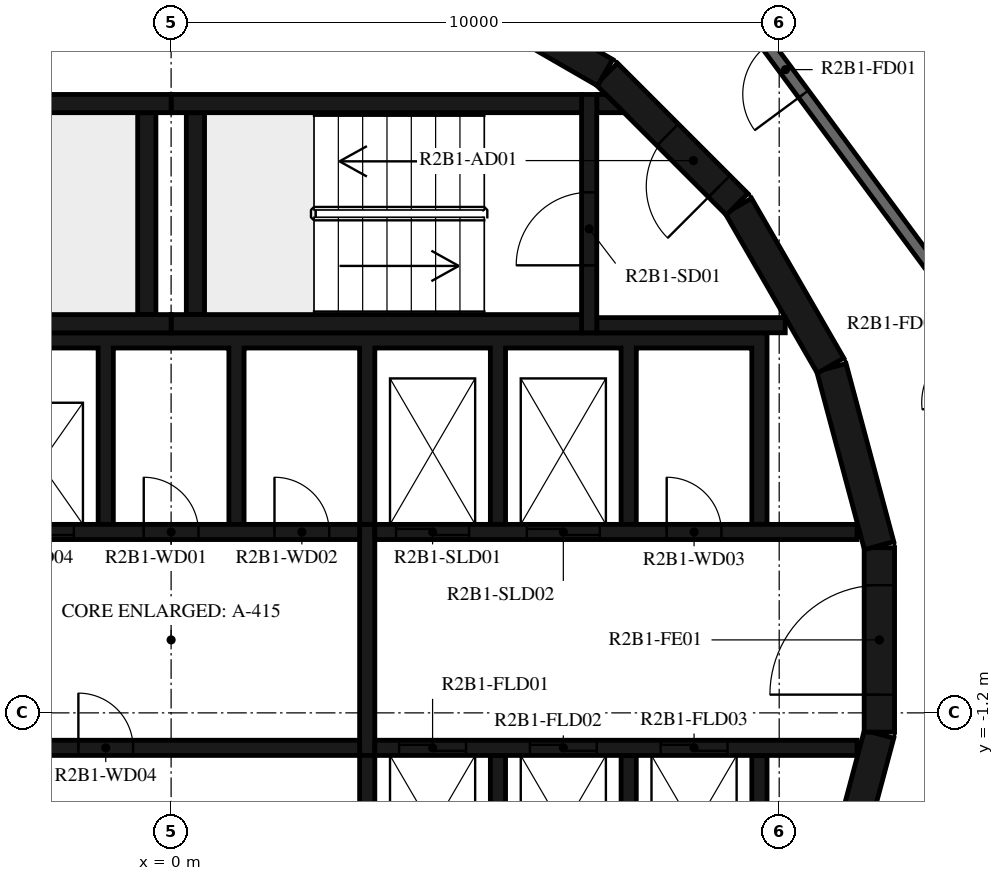
"""IFC4 building model, lengths in metres.
Left out: names, types, materials, properties, quantities, classifications, styles, units other than length and angle.
Written with IfcOpenShell. Run it as: python <this file> out.ifc"""

import sys

from ifc_helpers import new_model, si_unit, direction, frame, frame_2d, origin, place, context, subcontext, project, spatial, polyline, rectangle, outline, extrude, element, fill, save


model = new_model("IFC4")
c1 = context("Model", 3, precision=1e-05, world=origin(), true_north=direction((0.0, 1.0)))
c2 = subcontext(c1, "Body", "Model", "MODEL_VIEW")
j1 = project(units=[si_unit("LENGTHUNIT", "METRE"), si_unit("PLANEANGLEUNIT", "RADIAN")], contexts=[c1])
p1 = place(None, origin())
s1 = spatial("IfcSite", under=j1, at=p1, CompositionType="ELEMENT")
p2 = place(p1, origin())
s2 = spatial("IfcBuilding", under=s1, at=p2, CompositionType="ELEMENT")
p3 = place(p2, frame((0.0, 0.0, 87.2)))
s3 = spatial("IfcBuildingStorey", under=s2, at=p3, CompositionType="ELEMENT", Elevation=87.2)
p4 = place(p3, frame((10.858, -4.479, 0.0), z_axis=(0.0, 0.0, 1.0), x_axis=(0.258734743916, 0.965948410781, 0.0)))
e1 = element("IfcWall", 1, at=p4, inside=s3, PredefinedType="SHEAR", context=c2, shape_type="SweptSolid", body=[
    extrude(rectangle(XDim=3.033, YDim=0.5, at=frame_2d((1.516, 0.0))), origin(), (0.0, 0.0, 1.0), 3.12),
])
p5 = place(p3, frame((11.647, -1.516, 0.0), z_axis=(0.0, 0.0, 1.0), x_axis=(0.0, 1.0, 0.0)))
e2 = element("IfcWall", 2, at=p5, inside=s3, PredefinedType="SHEAR", context=c2, shape_type="SweptSolid", body=[
    extrude(rectangle(XDim=3.033, YDim=0.5, at=frame_2d((1.516, 0.0))), origin(), (0.0, 0.0, 1.0), 3.12),
])
p6 = place(p5, frame((0.616, 0.0, 0.0)))
e3 = element("IfcOpeningElement", 3, at=p6, cuts=e2, PredefinedType="OPENING", context=c2, shape_type="SweptSolid", body=[
    extrude(rectangle(XDim=1.8, YDim=2.1, at=frame_2d((0.9, 1.05))), frame((0.0, 0.26, 0.0), z_axis=(0.0, -1.0, 0.0), x_axis=(1.0, 0.0, 0.0)), (0.0, 0.0, 1.0), 0.52),
])
for number, where, z_axis, x_axis in (
    (4, (11.643, 1.55, 0.0), (0.0, 0.0, 1.0), (-0.259, 0.966, 0.0)),
    (5, (10.845, 4.51, 0.0), (0.0, 0.0, 1.0), (-0.5, 0.866, 0.0)),
):
    element("IfcWall", number, at=place(p3, frame(where, z_axis=z_axis, x_axis=x_axis)), inside=s3, PredefinedType="SHEAR", context=c2, shape_type="SweptSolid", body=[
        extrude(rectangle(XDim=3.033, YDim=0.5, at=frame_2d((1.516, 0.0))), origin(), (0.0, 0.0, 1.0), 3.12),
    ])
p7 = place(p3, frame((9.308, 7.164, 0.0), z_axis=(0.0, 0.0, 1.0), x_axis=(-0.707106781187, 0.707106781187, 0.0)))
e6 = element("IfcWall", 6, at=p7, inside=s3, PredefinedType="SHEAR", context=c2, shape_type="SweptSolid", body=[
    extrude(rectangle(XDim=3.032, YDim=0.5, at=frame_2d((1.516, 0.0))), origin(), (0.0, 0.0, 1.0), 3.12),
])
p8 = place(p7, frame((0.416, 0.0, 0.0)))
e7 = element("IfcOpeningElement", 7, at=p8, cuts=e6, PredefinedType="OPENING", context=c2, shape_type="SweptSolid", body=[
    extrude(rectangle(XDim=1.2, YDim=2.1, at=frame_2d((0.6, 1.05))), frame((0.0, 0.26, 0.0), z_axis=(0.0, -1.0, 0.0), x_axis=(1.0, 0.0, 0.0)), (0.0, 0.0, 1.0), 0.52),
])
p9 = place(p3, frame((7.137, 9.329, 0.0), z_axis=(0.0, 0.0, 1.0), x_axis=(-0.865975092491, 0.500087131594, 0.0)))
e8 = element("IfcWall", 8, at=p9, inside=s3, PredefinedType="SHEAR", context=c2, shape_type="SweptSolid", body=[
    extrude(rectangle(XDim=3.033, YDim=0.5, at=frame_2d((1.516, 0.0))), origin(), (0.0, 0.0, 1.0), 3.12),
])
for number, where, z_axis, x_axis in (
    (9, (0.0, 5.2, 0.0), (0.0, 0.0, 1.0), (1.0, 0.0, 0.0)),
    (10, (0.0, 8.82, 0.0), (0.0, 0.0, 1.0), (1.0, 0.0, 0.0)),
):
    element("IfcWall", number, at=place(p3, frame(where, z_axis=z_axis, x_axis=x_axis)), inside=s3, PredefinedType="SHEAR", context=c2, shape_type="SweptSolid", body=[
        extrude(rectangle(XDim=6.75, YDim=0.3, at=frame_2d((3.375, 0.0))), origin(), (0.0, 0.0, 1.0), 3.12),
    ])
p10 = place(p3, frame((0.4, 5.35, 0.0), z_axis=(0.0, 0.0, 1.0), x_axis=(0.0, 1.0, 0.0)))
e11 = element("IfcWall", 11, at=p10, inside=s3, PredefinedType="SHEAR", context=c2, shape_type="SweptSolid", body=[
    extrude(rectangle(XDim=3.32, YDim=0.3, at=frame_2d((1.66, 0.0))), origin(), (0.0, 0.0, 1.0), 3.12),
])
p11 = place(p3, frame((6.875, 5.05, 0.0), z_axis=(0.0, 0.0, 1.0), x_axis=(0.0, 1.0, 0.0)))
e12 = element("IfcWall", 12, at=p11, inside=s3, PredefinedType="SHEAR", context=c2, shape_type="SweptSolid", body=[
    extrude(rectangle(XDim=3.92, YDim=0.25, at=frame_2d((1.96, 0.0))), origin(), (0.0, 0.0, 1.0), 3.12),
])
p12 = place(p11, frame((1.11, 0.0, 0.0)))
e13 = element("IfcOpeningElement", 13, at=p12, cuts=e12, PredefinedType="OPENING", context=c2, shape_type="SweptSolid", body=[
    extrude(rectangle(XDim=1.2, YDim=2.1, at=frame_2d((0.6, 1.05))), frame((0.0, 0.135, 0.0), z_axis=(0.0, -1.0, 0.0), x_axis=(1.0, 0.0, 0.0)), (0.0, 0.0, 1.0), 0.27),
])
p13 = place(p3, frame((7.0, 5.175, 0.0), z_axis=(0.0, 0.0, 1.0), x_axis=(1.0, 0.0, 0.0)))
e14 = element("IfcWall", 14, at=p13, inside=s3, PredefinedType="SHEAR", context=c2, shape_type="SweptSolid", body=[
    extrude(rectangle(XDim=3.1, YDim=0.25, at=frame_2d((1.55, 0.0))), origin(), (0.0, 0.0, 1.0), 3.12),
])
p14 = place(p3, origin())
e15 = element("IfcWall", 15, at=p14, inside=s3, PredefinedType="SHEAR", context=c2, shape_type="SweptSolid", body=[
    extrude(outline(polyline([(7.448, 8.67), (7.0, 8.67), (7.0, 8.97), (7.148, 8.97), (7.448, 8.67)])), origin(), (0.0, 0.0, 1.0), 3.12),
])
for number, where, z_axis, x_axis in (
    (16, (-6.75, 5.2, 0.0), (0.0, 0.0, 1.0), (1.0, 0.0, 0.0)),
    (17, (-6.75, 8.82, 0.0), (0.0, 0.0, 1.0), (1.0, 0.0, 0.0)),
):
    element("IfcWall", number, at=place(p3, frame(where, z_axis=z_axis, x_axis=x_axis)), inside=s3, PredefinedType="SHEAR", context=c2, shape_type="SweptSolid", body=[
        extrude(rectangle(XDim=6.75, YDim=0.3, at=frame_2d((3.375, 0.0))), origin(), (0.0, 0.0, 1.0), 3.12),
    ])
p15 = place(p3, frame((-0.4, 5.35, 0.0), z_axis=(0.0, 0.0, 1.0), x_axis=(0.0, 1.0, 0.0)))
e18 = element("IfcWall", 18, at=p15, inside=s3, PredefinedType="SHEAR", context=c2, shape_type="SweptSolid", body=[
    extrude(rectangle(XDim=3.32, YDim=0.3, at=frame_2d((1.66, 0.0))), origin(), (0.0, 0.0, 1.0), 3.12),
])
p16 = place(p3, origin())
e19 = element("IfcWall", 19, at=p16, inside=s3, PredefinedType="SHEAR", context=c2, shape_type="SweptSolid", body=[
    extrude(outline(polyline([(-9.55, 4.8), (-7.65, 4.8), (-7.65, 1.9), (-7.4, 1.9), (-7.4, 4.8), (-5.5, 4.8), (-5.5, 1.9), (-5.25, 1.9), (-5.25, 4.8), (-3.35, 4.8), (-3.35, 1.9), (-3.1, 1.9), (-3.1, 4.8), (-1.2, 4.8), (-1.2, 1.9), (-0.95, 1.9), (-0.95, 4.8), (0.95, 4.8), (0.95, 1.9), (1.2, 1.9), (1.2, 4.8), (3.1, 4.8), (3.1, 1.9), (3.35, 1.9), (3.35, 4.8), (5.25, 4.8), (5.25, 1.9), (5.5, 1.9), (5.5, 4.8), (7.4, 4.8), (7.4, 1.9), (7.65, 1.9), (7.65, 4.8), (9.55, 4.8), (9.55, 1.9), (9.8, 1.9), (9.8, 4.8), (9.8, 5.05), (-9.8, 5.05), (-9.8, 4.8), (-9.8, 1.9), (-9.55, 1.9), (-9.55, 4.8)])), origin(), (0.0, 0.0, 1.0), 3.12),
])
p17 = place(p3, origin())
e20 = element("IfcWall", 20, at=p17, inside=s3, PredefinedType="SHEAR", context=c2, shape_type="SweptSolid", body=[
    extrude(outline(polyline([(9.8, -5.05), (9.8, -4.8), (9.8, -1.9), (9.55, -1.9), (9.55, -4.8), (7.65, -4.8), (7.65, -1.9), (7.4, -1.9), (7.4, -4.8), (5.5, -4.8), (5.5, -1.9), (5.25, -1.9), (5.25, -4.8), (3.35, -4.8), (3.35, -1.9), (3.1, -1.9), (3.1, -4.8), (-5.25, -4.8), (-5.25, -1.9), (-5.5, -1.9), (-5.5, -4.8), (-7.4, -4.8), (-7.4, -1.9), (-7.65, -1.9), (-7.65, -4.8), (-9.55, -4.8), (-9.55, -1.9), (-9.8, -1.9), (-9.8, -4.8), (-9.8, -5.05), (9.8, -5.05)])), origin(), (0.0, 0.0, 1.0), 3.12),
])
p18 = place(p3, frame((-11.28, 1.775, 0.0), z_axis=(0.0, 0.0, 1.0), x_axis=(1.0, 0.0, 0.0)))
e21 = element("IfcWall", 21, at=p18, inside=s3, PredefinedType="SHEAR", context=c2, shape_type="SweptSolid", body=[
    extrude(rectangle(XDim=14.38, YDim=0.25, at=frame_2d((7.19, 0.0))), origin(), (0.0, 0.0, 1.0), 3.12),
])
p19 = place(p18, frame((2.13, 0.0, 0.0)))
e22 = element("IfcOpeningElement", 22, at=p19, cuts=e21, PredefinedType="OPENING", context=c2, shape_type="SweptSolid", body=[
    extrude(rectangle(XDim=1.1, YDim=2.1, at=frame_2d((0.55, 1.05))), frame((0.0, 0.135, 0.0), z_axis=(0.0, -1.0, 0.0), x_axis=(1.0, 0.0, 0.0)), (0.0, 0.0, 1.0), 0.27),
])
p20 = place(p18, frame((4.28, 0.0, 0.0)))
e23 = element("IfcOpeningElement", 23, at=p20, cuts=e21, PredefinedType="OPENING", context=c2, shape_type="SweptSolid", body=[
    extrude(rectangle(XDim=1.1, YDim=2.1, at=frame_2d((0.55, 1.05))), frame((0.0, 0.135, 0.0), z_axis=(0.0, -1.0, 0.0), x_axis=(1.0, 0.0, 0.0)), (0.0, 0.0, 1.0), 0.27),
])
p21 = place(p18, frame((6.43, 0.0, 0.0)))
e24 = element("IfcOpeningElement", 24, at=p21, cuts=e21, PredefinedType="OPENING", context=c2, shape_type="SweptSolid", body=[
    extrude(rectangle(XDim=1.1, YDim=2.1, at=frame_2d((0.55, 1.05))), frame((0.0, 0.135, 0.0), z_axis=(0.0, -1.0, 0.0), x_axis=(1.0, 0.0, 0.0)), (0.0, 0.0, 1.0), 0.27),
])
p22 = place(p18, frame((8.58, 0.0, 0.0)))
e25 = element("IfcOpeningElement", 25, at=p22, cuts=e21, PredefinedType="OPENING", context=c2, shape_type="SweptSolid", body=[
    extrude(rectangle(XDim=1.1, YDim=2.1, at=frame_2d((0.55, 1.05))), frame((0.0, 0.135, 0.0), z_axis=(0.0, -1.0, 0.0), x_axis=(1.0, 0.0, 0.0)), (0.0, 0.0, 1.0), 0.27),
])
p23 = place(p18, frame((10.83, 0.0, 0.0)))
e26 = element("IfcOpeningElement", 26, at=p23, cuts=e21, PredefinedType="OPENING", context=c2, shape_type="SweptSolid", body=[
    extrude(rectangle(XDim=0.9, YDim=2.1, at=frame_2d((0.45, 1.05))), frame((0.0, 0.135, 0.0), z_axis=(0.0, -1.0, 0.0), x_axis=(1.0, 0.0, 0.0)), (0.0, 0.0, 1.0), 0.27),
])
p24 = place(p18, frame((12.98, 0.0, 0.0)))
e27 = element("IfcOpeningElement", 27, at=p24, cuts=e21, PredefinedType="OPENING", context=c2, shape_type="SweptSolid", body=[
    extrude(rectangle(XDim=0.9, YDim=2.1, at=frame_2d((0.45, 1.05))), frame((0.0, 0.135, 0.0), z_axis=(0.0, -1.0, 0.0), x_axis=(1.0, 0.0, 0.0)), (0.0, 0.0, 1.0), 0.27),
])
p25 = place(p3, frame((3.35, 1.775, 0.0), z_axis=(0.0, 0.0, 1.0), x_axis=(1.0, 0.0, 0.0)))
e28 = element("IfcWall", 28, at=p25, inside=s3, PredefinedType="SHEAR", context=c2, shape_type="SweptSolid", body=[
    extrude(rectangle(XDim=7.93, YDim=0.25, at=frame_2d((3.965, 0.0))), origin(), (0.0, 0.0, 1.0), 3.12),
])
p26 = place(p25, frame((0.35, 0.0, 0.0)))
e29 = element("IfcOpeningElement", 29, at=p26, cuts=e28, PredefinedType="OPENING", context=c2, shape_type="SweptSolid", body=[
    extrude(rectangle(XDim=1.2, YDim=2.4, at=frame_2d((0.6, 1.2))), frame((0.0, 0.135, 0.0), z_axis=(0.0, -1.0, 0.0), x_axis=(1.0, 0.0, 0.0)), (0.0, 0.0, 1.0), 0.27),
])
p27 = place(p25, frame((2.5, 0.0, 0.0)))
e30 = element("IfcOpeningElement", 30, at=p27, cuts=e28, PredefinedType="OPENING", context=c2, shape_type="SweptSolid", body=[
    extrude(rectangle(XDim=1.2, YDim=2.4, at=frame_2d((0.6, 1.2))), frame((0.0, 0.135, 0.0), z_axis=(0.0, -1.0, 0.0), x_axis=(1.0, 0.0, 0.0)), (0.0, 0.0, 1.0), 0.27),
])
p28 = place(p25, frame((4.8, 0.0, 0.0)))
e31 = element("IfcOpeningElement", 31, at=p28, cuts=e28, PredefinedType="OPENING", context=c2, shape_type="SweptSolid", body=[
    extrude(rectangle(XDim=0.9, YDim=2.1, at=frame_2d((0.45, 1.05))), frame((0.0, 0.135, 0.0), z_axis=(0.0, -1.0, 0.0), x_axis=(1.0, 0.0, 0.0)), (0.0, 0.0, 1.0), 0.27),
])
p29 = place(p3, frame((-11.28, -1.775, 0.0), z_axis=(0.0, 0.0, 1.0), x_axis=(1.0, 0.0, 0.0)))
e32 = element("IfcWall", 32, at=p29, inside=s3, PredefinedType="SHEAR", context=c2, shape_type="SweptSolid", body=[
    extrude(rectangle(XDim=14.38, YDim=0.25, at=frame_2d((7.19, 0.0))), origin(), (0.0, 0.0, 1.0), 3.12),
])
p30 = place(p29, frame((9.755, 0.0, 0.0)))
e33 = element("IfcOpeningElement", 33, at=p30, cuts=e32, PredefinedType="OPENING", context=c2, shape_type="SweptSolid", body=[
    extrude(rectangle(XDim=0.9, YDim=2.1, at=frame_2d((0.45, 1.05))), frame((0.0, 0.135, 0.0), z_axis=(0.0, -1.0, 0.0), x_axis=(1.0, 0.0, 0.0)), (0.0, 0.0, 1.0), 0.27),
])
p31 = place(p3, frame((3.35, -1.775, 0.0), z_axis=(0.0, 0.0, 1.0), x_axis=(1.0, 0.0, 0.0)))
e34 = element("IfcWall", 34, at=p31, inside=s3, PredefinedType="SHEAR", context=c2, shape_type="SweptSolid", body=[
    extrude(rectangle(XDim=7.93, YDim=0.25, at=frame_2d((3.965, 0.0))), origin(), (0.0, 0.0, 1.0), 3.12),
])
p32 = place(p31, frame((0.4, 0.0, 0.0)))
e35 = element("IfcOpeningElement", 35, at=p32, cuts=e34, PredefinedType="OPENING", context=c2, shape_type="SweptSolid", body=[
    extrude(rectangle(XDim=1.1, YDim=2.4, at=frame_2d((0.55, 1.2))), frame((0.0, 0.135, 0.0), z_axis=(0.0, -1.0, 0.0), x_axis=(1.0, 0.0, 0.0)), (0.0, 0.0, 1.0), 0.27),
])
p33 = place(p31, frame((2.55, 0.0, 0.0)))
e36 = element("IfcOpeningElement", 36, at=p33, cuts=e34, PredefinedType="OPENING", context=c2, shape_type="SweptSolid", body=[
    extrude(rectangle(XDim=1.1, YDim=2.4, at=frame_2d((0.55, 1.2))), frame((0.0, 0.135, 0.0), z_axis=(0.0, -1.0, 0.0), x_axis=(1.0, 0.0, 0.0)), (0.0, 0.0, 1.0), 0.27),
])
p34 = place(p31, frame((4.7, 0.0, 0.0)))
e37 = element("IfcOpeningElement", 37, at=p34, cuts=e34, PredefinedType="OPENING", context=c2, shape_type="SweptSolid", body=[
    extrude(rectangle(XDim=1.1, YDim=2.4, at=frame_2d((0.55, 1.2))), frame((0.0, 0.135, 0.0), z_axis=(0.0, -1.0, 0.0), x_axis=(1.0, 0.0, 0.0)), (0.0, 0.0, 1.0), 0.27),
])
p35 = place(p3, frame((3.225, -1.9, 0.0), z_axis=(0.0, 0.0, 1.0), x_axis=(0.0, 1.0, 0.0)))
e38 = element("IfcWall", 38, at=p35, inside=s3, PredefinedType="SHEAR", context=c2, shape_type="SweptSolid", body=[
    extrude(rectangle(XDim=3.8, YDim=0.25, at=frame_2d((1.9, 0.0))), origin(), (0.0, 0.0, 1.0), 3.12),
])
p36 = place(p3, frame((13.196, 5.198, 0.0), z_axis=(0.0, 0.0, 1.0), x_axis=(-0.594805187394, 0.803869883159, 0.0)))
e39 = element("IfcWall", 39, at=p36, inside=s3, PredefinedType="STANDARD", context=c2, shape_type="SweptSolid", body=[
    extrude(rectangle(XDim=7.342, YDim=0.2, at=frame_2d((3.671, 0.0))), origin(), (0.0, 0.0, 1.0), 3.12),
])
p37 = place(p36, frame((4.7, 0.0, 0.0)))
e40 = element("IfcOpeningElement", 40, at=p37, cuts=e39, PredefinedType="OPENING", context=c2, shape_type="SweptSolid", body=[
    extrude(rectangle(XDim=1.0, YDim=2.1, at=frame_2d((0.5, 1.05))), frame((0.0, 0.11, 0.0), z_axis=(0.0, -1.0, 0.0), x_axis=(1.0, 0.0, 0.0)), (0.0, 0.0, 1.0), 0.22),
])
p38 = place(p3, frame((11.1, -8.829, 0.0), z_axis=(0.0, 0.0, 1.0), x_axis=(0.398741918631, 0.917063183388, 0.0)))
e41 = element("IfcWall", 41, at=p38, inside=s3, PredefinedType="STANDARD", context=c2, shape_type="SweptSolid", body=[
    extrude(rectangle(XDim=7.342, YDim=0.2, at=frame_2d((3.671, 0.0))), origin(), (0.0, 0.0, 1.0), 3.12),
])
p39 = place(p3, frame((13.995, 8.336, 0.0), z_axis=(0.0, 0.0, 1.0), x_axis=(-0.59480284986, 0.803871612758, 0.0)))
e42 = element("IfcWall", 42, at=p39, inside=s3, PredefinedType="PARTITIONING", context=c2, shape_type="SweptSolid", body=[
    extrude(rectangle(XDim=4.4, YDim=0.12, at=frame_2d((2.2, 0.0))), origin(), (0.0, 0.0, 1.0), 3.12),
])
p40 = place(p12, origin())
e43 = element("IfcDoor", 43, at=p40, inside=s3, OperationType="SINGLE_SWING_LEFT", PredefinedType="DOOR", context=c2, shape_type="SweptSolid", body=[
    extrude(rectangle(XDim=1.2, YDim=2.1, at=frame_2d((0.6, 1.05))), frame((0.0, 0.025, 0.0), z_axis=(0.0, -1.0, 0.0), x_axis=(1.0, 0.0, 0.0)), (0.0, 0.0, 1.0), 0.05),
])
fill(e13, e43)
p41 = place(p8, origin())
e44 = element("IfcDoor", 44, at=p41, inside=s3, OperationType="SINGLE_SWING_RIGHT", PredefinedType="DOOR", context=c2, shape_type="SweptSolid", body=[
    extrude(rectangle(XDim=1.2, YDim=2.1, at=frame_2d((0.6, 1.05))), frame((0.0, 0.025, 0.0), z_axis=(0.0, -1.0, 0.0), x_axis=(1.0, 0.0, 0.0)), (0.0, 0.0, 1.0), 0.05),
])
fill(e7, e44)
p42 = place(p6, origin())
e45 = element("IfcDoor", 45, at=p42, inside=s3, OperationType="DOUBLE_DOOR_SINGLE_SWING", PredefinedType="DOOR", context=c2, shape_type="SweptSolid", body=[
    extrude(rectangle(XDim=1.8, YDim=2.1, at=frame_2d((0.9, 1.05))), frame((0.0, 0.025, 0.0), z_axis=(0.0, -1.0, 0.0), x_axis=(1.0, 0.0, 0.0)), (0.0, 0.0, 1.0), 0.05),
])
fill(e3, e45)
p43 = place(p22, origin())
e46 = element("IfcDoor", 46, at=p43, inside=s3, OperationType="DOUBLE_DOOR_SLIDING", PredefinedType="DOOR", context=c2, shape_type="SweptSolid", body=[
    extrude(rectangle(XDim=1.1, YDim=2.1, at=frame_2d((0.55, 1.05))), frame((0.0, 0.025, 0.0), z_axis=(0.0, -1.0, 0.0), x_axis=(1.0, 0.0, 0.0)), (0.0, 0.0, 1.0), 0.05),
])
fill(e25, e46)
p44 = place(p26, origin())
e47 = element("IfcDoor", 47, at=p44, inside=s3, OperationType="DOUBLE_DOOR_SLIDING", PredefinedType="DOOR", context=c2, shape_type="SweptSolid", body=[
    extrude(rectangle(XDim=1.2, YDim=2.4, at=frame_2d((0.6, 1.2))), frame((0.0, 0.025, 0.0), z_axis=(0.0, -1.0, 0.0), x_axis=(1.0, 0.0, 0.0)), (0.0, 0.0, 1.0), 0.05),
])
fill(e29, e47)
p45 = place(p27, origin())
e48 = element("IfcDoor", 48, at=p45, inside=s3, OperationType="DOUBLE_DOOR_SLIDING", PredefinedType="DOOR", context=c2, shape_type="SweptSolid", body=[
    extrude(rectangle(XDim=1.2, YDim=2.4, at=frame_2d((0.6, 1.2))), frame((0.0, 0.025, 0.0), z_axis=(0.0, -1.0, 0.0), x_axis=(1.0, 0.0, 0.0)), (0.0, 0.0, 1.0), 0.05),
])
fill(e30, e48)
p46 = place(p32, origin())
e49 = element("IfcDoor", 49, at=p46, inside=s3, OperationType="DOUBLE_DOOR_SLIDING", PredefinedType="DOOR", context=c2, shape_type="SweptSolid", body=[
    extrude(rectangle(XDim=1.1, YDim=2.4, at=frame_2d((0.55, 1.2))), frame((0.0, 0.025, 0.0), z_axis=(0.0, -1.0, 0.0), x_axis=(1.0, 0.0, 0.0)), (0.0, 0.0, 1.0), 0.05),
])
fill(e35, e49)
p47 = place(p33, origin())
e50 = element("IfcDoor", 50, at=p47, inside=s3, OperationType="DOUBLE_DOOR_SLIDING", PredefinedType="DOOR", context=c2, shape_type="SweptSolid", body=[
    extrude(rectangle(XDim=1.1, YDim=2.4, at=frame_2d((0.55, 1.2))), frame((0.0, 0.025, 0.0), z_axis=(0.0, -1.0, 0.0), x_axis=(1.0, 0.0, 0.0)), (0.0, 0.0, 1.0), 0.05),
])
fill(e36, e50)
p48 = place(p34, origin())
e51 = element("IfcDoor", 51, at=p48, inside=s3, OperationType="DOUBLE_DOOR_SLIDING", PredefinedType="DOOR", context=c2, shape_type="SweptSolid", body=[
    extrude(rectangle(XDim=1.1, YDim=2.4, at=frame_2d((0.55, 1.2))), frame((0.0, 0.025, 0.0), z_axis=(0.0, -1.0, 0.0), x_axis=(1.0, 0.0, 0.0)), (0.0, 0.0, 1.0), 0.05),
])
fill(e37, e51)
p49 = place(p23, origin())
e52 = element("IfcDoor", 52, at=p49, inside=s3, OperationType="SINGLE_SWING_RIGHT", PredefinedType="DOOR", context=c2, shape_type="SweptSolid", body=[
    extrude(rectangle(XDim=0.9, YDim=2.1, at=frame_2d((0.45, 1.05))), frame((0.0, 0.025, 0.0), z_axis=(0.0, -1.0, 0.0), x_axis=(1.0, 0.0, 0.0)), (0.0, 0.0, 1.0), 0.05),
])
fill(e26, e52)
p50 = place(p24, origin())
e53 = element("IfcDoor", 53, at=p50, inside=s3, OperationType="SINGLE_SWING_LEFT", PredefinedType="DOOR", context=c2, shape_type="SweptSolid", body=[
    extrude(rectangle(XDim=0.9, YDim=2.1, at=frame_2d((0.45, 1.05))), frame((0.0, 0.025, 0.0), z_axis=(0.0, -1.0, 0.0), x_axis=(1.0, 0.0, 0.0)), (0.0, 0.0, 1.0), 0.05),
])
fill(e27, e53)
p51 = place(p28, origin())
e54 = element("IfcDoor", 54, at=p51, inside=s3, OperationType="SINGLE_SWING_RIGHT", PredefinedType="DOOR", context=c2, shape_type="SweptSolid", body=[
    extrude(rectangle(XDim=0.9, YDim=2.1, at=frame_2d((0.45, 1.05))), frame((0.0, 0.025, 0.0), z_axis=(0.0, -1.0, 0.0), x_axis=(1.0, 0.0, 0.0)), (0.0, 0.0, 1.0), 0.05),
])
fill(e31, e54)
p52 = place(p30, origin())
e55 = element("IfcDoor", 55, at=p52, inside=s3, OperationType="SINGLE_SWING_LEFT", PredefinedType="DOOR", context=c2, shape_type="SweptSolid", body=[
    extrude(rectangle(XDim=0.9, YDim=2.1, at=frame_2d((0.45, 1.05))), frame((0.0, 0.025, 0.0), z_axis=(0.0, -1.0, 0.0), x_axis=(1.0, 0.0, 0.0)), (0.0, 0.0, 1.0), 0.05),
])
fill(e33, e55)
p53 = place(p37, origin())
e56 = element("IfcDoor", 56, at=p53, inside=s3, OperationType="SINGLE_SWING_RIGHT", PredefinedType="DOOR", context=c2, shape_type="SweptSolid", body=[
    extrude(rectangle(XDim=1.0, YDim=2.1, at=frame_2d((0.5, 1.05))), frame((0.0, 0.025, 0.0), z_axis=(0.0, -1.0, 0.0), x_axis=(1.0, 0.0, 0.0)), (0.0, 0.0, 1.0), 0.05),
])
fill(e40, e56)
save(model, sys.argv[1])
